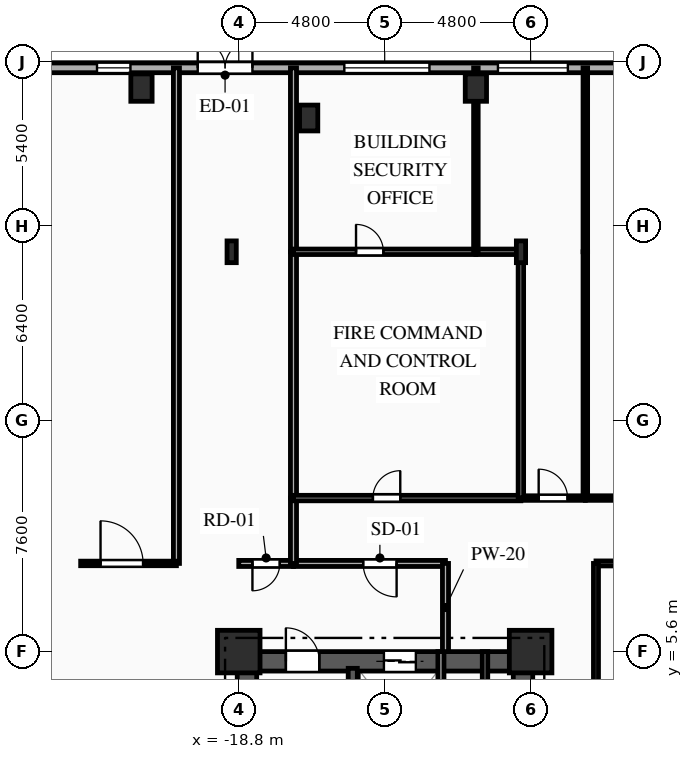
"""IFC4 building model, lengths in metres.
Left out: names, types, materials, properties, quantities, classifications, styles, units other than length and angle.
Written with IfcOpenShell. Run it as: python <this file> out.ifc"""

import sys

from ifc_helpers import new_model, si_unit, direction, frame, frame_2d, origin, origin_2d, place, context, subcontext, project, spatial, rectangle, i_section, extrude, element, fill, save


model = new_model("IFC4")
c1 = context("Model", 3, precision=1e-05, world=origin(), true_north=direction((0.0, 1.0)))
c2 = subcontext(c1, "Body", "Model", "MODEL_VIEW")
j1 = project(units=[si_unit("LENGTHUNIT", "METRE"), si_unit("PLANEANGLEUNIT", "RADIAN")], contexts=[c1])
p1 = place(None, origin())
s1 = spatial("IfcSite", under=j1, at=p1, CompositionType="ELEMENT")
p2 = place(p1, origin())
s2 = spatial("IfcBuilding", under=s1, at=p2, CompositionType="ELEMENT")
p3 = place(p2, origin())
s3 = spatial("IfcBuildingStorey", under=s2, at=p3, CompositionType="ELEMENT", Elevation=0.0)
for number, where, z_axis, x_axis in (
    (1, (-18.8, 5.6, 0.0), (0.0, 0.0, 1.0), (1.0, 0.0, 0.0)),
    (2, (-9.2, 5.6, 0.0), (0.0, 0.0, 1.0), (1.0, 0.0, 0.0)),
):
    element("IfcColumn", number, at=place(p3, frame(where, z_axis=z_axis, x_axis=x_axis)), inside=s3, PredefinedType="COLUMN", context=c2, shape_type="SweptSolid", body=[
        extrude(rectangle(XDim=1.4, YDim=1.4, at=origin_2d()), origin(), (0.0, 0.0, 1.0), 4.5),
    ])
for number, where, z_axis, x_axis in (
    (3, (-22.0, 24.15, 0.0), (0.0, 0.0, 1.0), (1.0, 0.0, 0.0)),
    (4, (-11.0, 24.15, 0.0), (0.0, 0.0, 1.0), (1.0, 0.0, 0.0)),
):
    element("IfcColumn", number, at=place(p3, frame(where, z_axis=z_axis, x_axis=x_axis)), inside=s3, PredefinedType="COLUMN", context=c2, shape_type="SweptSolid", body=[
        extrude(rectangle(XDim=0.7, YDim=0.9, at=origin_2d()), origin(), (0.0, 0.0, 1.0), 4.5),
    ])
p4 = place(p3, frame((-16.5, 23.15, 0.0), z_axis=(0.0, 0.0, 1.0), x_axis=(1.0, 0.0, 0.0)))
e5 = element("IfcColumn", 5, at=p4, inside=s3, PredefinedType="PILASTER", context=c2, shape_type="SweptSolid", body=[
    extrude(rectangle(XDim=0.6, YDim=0.85, at=origin_2d()), origin(), (0.0, 0.0, 1.0), 4.5),
])
for number, where, z_axis, x_axis in (
    (6, (-9.517, 18.75, 0.0), (0.0, 0.0, 1.0), (1.0, 0.0, 0.0)),
    (7, (-19.033, 18.75, 0.0), (0.0, 0.0, 1.0), (1.0, 0.0, 0.0)),
):
    element("IfcColumn", number, at=place(p3, frame(where, z_axis=z_axis, x_axis=x_axis)), inside=s3, PredefinedType="COLUMN", context=c2, shape_type="SweptSolid", body=[
        extrude(i_section(OverallWidth=0.304, OverallDepth=0.716, WebThickness=0.021, FlangeThickness=0.04, FilletRadius=0.027, at=origin_2d()), origin(), (0.0, 0.0, 1.0), 4.5),
    ])
p5 = place(p3, frame((-38.3, 24.8, 0.0), z_axis=(0.0, 0.0, 1.0), x_axis=(1.0, 0.0, 0.0)))
e8 = element("IfcWall", 8, at=p5, inside=s3, PredefinedType="SOLIDWALL", context=c2, shape_type="SweptSolid", body=[
    extrude(rectangle(XDim=76.6, YDim=0.32, at=frame_2d((38.3, 0.0))), origin(), (0.0, 0.0, 1.0), 4.17),
])
p6 = place(p5, frame((18.15, 0.0, 0.0)))
e9 = element("IfcOpeningElement", 9, at=p6, cuts=e8, PredefinedType="OPENING", context=c2, shape_type="SweptSolid", body=[
    extrude(rectangle(XDim=1.8, YDim=2.4, at=frame_2d((0.9, 1.2))), frame((0.0, 0.17, 0.0), z_axis=(0.0, -1.0, 0.0), x_axis=(1.0, 0.0, 0.0)), (0.0, 0.0, 1.0), 0.34),
])
p7 = place(p5, frame((31.9, 0.0, 0.0)))
e10 = element("IfcOpeningElement", 10, at=p7, cuts=e8, PredefinedType="OPENING", context=c2, shape_type="SweptSolid", body=[
    extrude(rectangle(XDim=1.8, YDim=2.4, at=frame_2d((0.9, 1.2))), frame((0.0, 0.17, 0.0), z_axis=(0.0, -1.0, 0.0), x_axis=(1.0, 0.0, 0.0)), (0.0, 0.0, 1.0), 0.34),
])
p8 = place(p5, frame((42.9, 0.0, 0.0)))
e11 = element("IfcOpeningElement", 11, at=p8, cuts=e8, PredefinedType="OPENING", context=c2, shape_type="SweptSolid", body=[
    extrude(rectangle(XDim=1.8, YDim=2.4, at=frame_2d((0.9, 1.2))), frame((0.0, 0.17, 0.0), z_axis=(0.0, -1.0, 0.0), x_axis=(1.0, 0.0, 0.0)), (0.0, 0.0, 1.0), 0.34),
])
p9 = place(p5, frame((56.65, 0.0, 0.0)))
e12 = element("IfcOpeningElement", 12, at=p9, cuts=e8, PredefinedType="OPENING", context=c2, shape_type="SweptSolid", body=[
    extrude(rectangle(XDim=1.8, YDim=2.4, at=frame_2d((0.9, 1.2))), frame((0.0, 0.17, 0.0), z_axis=(0.0, -1.0, 0.0), x_axis=(1.0, 0.0, 0.0)), (0.0, 0.0, 1.0), 0.34),
])
p10 = place(p5, frame((14.838, 0.0, 0.85)))
e13 = element("IfcOpeningElement", 13, at=p10, cuts=e8, PredefinedType="OPENING", context=c2, shape_type="SweptSolid", body=[
    extrude(rectangle(XDim=1.1, YDim=1.85, at=frame_2d((0.55, 0.925))), frame((0.0, 0.17, 0.0), z_axis=(0.0, -1.0, 0.0), x_axis=(1.0, 0.0, 0.0)), (0.0, 0.0, 1.0), 0.34),
])
p11 = place(p5, frame((22.973, 0.0, 0.85)))
e14 = element("IfcOpeningElement", 14, at=p11, cuts=e8, PredefinedType="OPENING", context=c2, shape_type="SweptSolid", body=[
    extrude(rectangle(XDim=2.8, YDim=2.4, at=frame_2d((1.4, 1.2))), frame((0.0, 0.17, 0.0), z_axis=(0.0, -1.0, 0.0), x_axis=(1.0, 0.0, 0.0)), (0.0, 0.0, 1.0), 0.34),
])
p12 = place(p5, frame((28.025, 0.0, 0.85)))
e15 = element("IfcOpeningElement", 15, at=p12, cuts=e8, PredefinedType="OPENING", context=c2, shape_type="SweptSolid", body=[
    extrude(rectangle(XDim=2.3, YDim=2.4, at=frame_2d((1.15, 1.2))), frame((0.0, 0.17, 0.0), z_axis=(0.0, -1.0, 0.0), x_axis=(1.0, 0.0, 0.0)), (0.0, 0.0, 1.0), 0.34),
])
p13 = place(p5, frame((34.521, 0.0, 0.85)))
e16 = element("IfcOpeningElement", 16, at=p13, cuts=e8, PredefinedType="OPENING", context=c2, shape_type="SweptSolid", body=[
    extrude(rectangle(XDim=2.8, YDim=2.4, at=frame_2d((1.4, 1.2))), frame((0.0, 0.17, 0.0), z_axis=(0.0, -1.0, 0.0), x_axis=(1.0, 0.0, 0.0)), (0.0, 0.0, 1.0), 0.34),
])
p14 = place(p3, frame((-18.8, 5.28, 0.0), z_axis=(0.0, 0.0, 1.0), x_axis=(1.0, 0.0, 0.0)))
e17 = element("IfcWall", 17, at=p14, inside=s3, PredefinedType="SHEAR", context=c2, shape_type="SweptSolid", body=[
    extrude(rectangle(XDim=9.6, YDim=0.64, at=frame_2d((4.8, 0.0))), origin(), (0.0, 0.0, 1.0), 4.17),
])
p15 = place(p14, frame((1.55, 0.0, 0.0)))
e18 = element("IfcOpeningElement", 18, at=p15, cuts=e17, PredefinedType="OPENING", context=c2, shape_type="SweptSolid", body=[
    extrude(rectangle(XDim=1.1, YDim=2.15, at=frame_2d((0.55, 1.075))), frame((0.0, 0.33, 0.0), z_axis=(0.0, -1.0, 0.0), x_axis=(1.0, 0.0, 0.0)), (0.0, 0.0, 1.0), 0.66),
])
p16 = place(p14, frame((4.775, 0.0, 0.0)))
e19 = element("IfcOpeningElement", 19, at=p16, cuts=e17, PredefinedType="OPENING", context=c2, shape_type="SweptSolid", body=[
    extrude(rectangle(XDim=1.05, YDim=2.1, at=frame_2d((0.525, 1.05))), frame((0.0, 0.33, 0.0), z_axis=(0.0, -1.0, 0.0), x_axis=(1.0, 0.0, 0.0)), (0.0, 0.0, 1.0), 0.66),
])
p17 = place(p3, frame((-18.53, -5.05, 0.0), z_axis=(0.0, 0.0, 1.0), x_axis=(0.0, 1.0, 0.0)))
e20 = element("IfcWall", 20, at=p17, inside=s3, PredefinedType="SHEAR", context=c2, shape_type="SweptSolid", body=[
    extrude(rectangle(XDim=10.1, YDim=0.64, at=frame_2d((5.05, 0.0))), origin(), (0.0, 0.0, 1.0), 4.17),
])
p18 = place(p3, frame((-9.45, -5.05, 0.0), z_axis=(0.0, 0.0, 1.0), x_axis=(0.0, 1.0, 0.0)))
e21 = element("IfcWall", 21, at=p18, inside=s3, PredefinedType="SHEAR", context=c2, shape_type="SweptSolid", body=[
    extrude(rectangle(XDim=10.1, YDim=0.64, at=frame_2d((5.05, 0.0))), origin(), (0.0, 0.0, 1.0), 4.17),
])
p19 = place(p18, frame((7.15, 0.0, 0.0)))
e22 = element("IfcOpeningElement", 22, at=p19, cuts=e21, PredefinedType="OPENING", context=c2, shape_type="SweptSolid", body=[
    extrude(rectangle(XDim=0.9, YDim=2.1, at=frame_2d((0.45, 1.05))), frame((0.0, 0.33, 0.0), z_axis=(0.0, -1.0, 0.0), x_axis=(1.0, 0.0, 0.0)), (0.0, 0.0, 1.0), 0.66),
])
p20 = place(p18, frame((2.4, 0.0, 0.0)))
e23 = element("IfcOpeningElement", 23, at=p20, cuts=e21, PredefinedType="OPENING", context=c2, shape_type="SweptSolid", body=[
    extrude(rectangle(XDim=1.2, YDim=2.15, at=frame_2d((0.6, 1.075))), frame((0.0, 0.33, 0.0), z_axis=(0.0, -1.0, 0.0), x_axis=(1.0, 0.0, 0.0)), (0.0, 0.0, 1.0), 0.66),
])
p21 = place(p3, frame((-15.05, -5.05, 0.0), z_axis=(0.0, 0.0, 1.0), x_axis=(0.0, 1.0, 0.0)))
e24 = element("IfcWall", 24, at=p21, inside=s3, PredefinedType="SHEAR", context=c2, shape_type="SweptSolid", body=[
    extrude(rectangle(XDim=10.1, YDim=0.3, at=frame_2d((5.05, 0.0))), origin(), (0.0, 0.0, 1.0), 4.17),
])
p22 = place(p3, frame((-12.15, 1.55, 0.0), z_axis=(0.0, 0.0, 1.0), x_axis=(0.0, 1.0, 0.0)))
e25 = element("IfcWall", 25, at=p22, inside=s3, PredefinedType="PARTITIONING", context=c2, shape_type="SweptSolid", body=[
    extrude(rectangle(XDim=4.05, YDim=0.2, at=frame_2d((2.025, 0.0))), origin(), (0.0, 0.0, 1.0), 4.17),
])
p23 = place(p3, frame((-17.0, 8.5, 0.0), z_axis=(0.0, 0.0, 1.0), x_axis=(-1.0, 0.0, 0.0)))
e26 = element("IfcWall", 26, at=p23, inside=s3, PredefinedType="PARTITIONING", context=c2, shape_type="SweptSolid", body=[
    extrude(rectangle(XDim=1.8, YDim=0.2, at=frame_2d((0.9, 0.0))), origin(), (0.0, 0.0, 1.0), 4.17),
])
p24 = place(p23, frame((0.45, 0.0, 0.0)))
e27 = element("IfcOpeningElement", 27, at=p24, cuts=e26, PredefinedType="OPENING", context=c2, shape_type="SweptSolid", body=[
    extrude(rectangle(XDim=0.9, YDim=2.1, at=frame_2d((0.45, 1.05))), frame((0.0, 0.11, 0.0), z_axis=(0.0, -1.0, 0.0), x_axis=(1.0, 0.0, 0.0)), (0.0, 0.0, 1.0), 0.22),
])
p25 = place(p3, frame((-12.0, 8.5, 0.0), z_axis=(0.0, 0.0, 1.0), x_axis=(-1.0, 0.0, 0.0)))
e28 = element("IfcWall", 28, at=p25, inside=s3, PredefinedType="PARTITIONING", context=c2, shape_type="SweptSolid", body=[
    extrude(rectangle(XDim=5.0, YDim=0.2, at=frame_2d((2.5, 0.0))), origin(), (0.0, 0.0, 1.0), 4.17),
])
p26 = place(p25, frame((1.607, 0.0, 0.0)))
e29 = element("IfcOpeningElement", 29, at=p26, cuts=e28, PredefinedType="OPENING", context=c2, shape_type="SweptSolid", body=[
    extrude(rectangle(XDim=1.1, YDim=2.15, at=frame_2d((0.55, 1.075))), frame((0.0, 0.11, 0.0), z_axis=(0.0, -1.0, 0.0), x_axis=(1.0, 0.0, 0.0)), (0.0, 0.0, 1.0), 0.22),
])
p27 = place(p3, frame((-12.0, 5.6, 0.0), z_axis=(0.0, 0.0, 1.0), x_axis=(0.0, 1.0, 0.0)))
e30 = element("IfcWall", 30, at=p27, inside=s3, PredefinedType="PARTITIONING", context=c2, shape_type="SweptSolid", body=[
    extrude(rectangle(XDim=2.9, YDim=0.2, at=frame_2d((1.45, 0.0))), origin(), (0.0, 0.0, 1.0), 4.17),
])
p28 = place(p3, frame((-10.7, 5.6, 0.0), z_axis=(0.0, 0.0, 1.0), x_axis=(0.0, -1.0, 0.0)))
e31 = element("IfcWall", 31, at=p28, inside=s3, PredefinedType="PARTITIONING", context=c2, shape_type="SweptSolid", body=[
    extrude(rectangle(XDim=4.05, YDim=0.18, at=frame_2d((2.025, 0.0))), origin(), (0.0, 0.0, 1.0), 4.17),
])
p29 = place(p28, frame((1.325, 0.0, 0.0)))
e32 = element("IfcOpeningElement", 32, at=p29, cuts=e31, PredefinedType="OPENING", context=c2, shape_type="SweptSolid", body=[
    extrude(rectangle(XDim=1.25, YDim=2.2, at=frame_2d((0.625, 1.1))), frame((0.0, 0.1, 0.0), z_axis=(0.0, -1.0, 0.0), x_axis=(1.0, 0.0, 0.0)), (0.0, 0.0, 1.0), 0.2),
])
p30 = place(p3, frame((-17.0, 10.65, 0.0), z_axis=(0.0, 0.0, 1.0), x_axis=(0.0, -1.0, 0.0)))
e33 = element("IfcWall", 33, at=p30, inside=s3, PredefinedType="PARTITIONING", context=c2, shape_type="SweptSolid", body=[
    extrude(rectangle(XDim=2.15, YDim=0.2, at=frame_2d((1.075, 0.0))), origin(), (0.0, 0.0, 1.0), 4.17),
])
p31 = place(p3, frame((-17.0, 18.75, 0.0), z_axis=(0.0, 0.0, 1.0), x_axis=(0.0, -1.0, 0.0)))
e34 = element("IfcWall", 34, at=p31, inside=s3, PredefinedType="PARTITIONING", context=c2, shape_type="SweptSolid", body=[
    extrude(rectangle(XDim=8.1, YDim=0.2, at=frame_2d((4.05, 0.0))), origin(), (0.0, 0.0, 1.0), 4.17),
])
p32 = place(p3, frame((-17.0, 24.8, 0.0), z_axis=(0.0, 0.0, 1.0), x_axis=(0.0, -1.0, 0.0)))
e35 = element("IfcWall", 35, at=p32, inside=s3, PredefinedType="PARTITIONING", context=c2, shape_type="SweptSolid", body=[
    extrude(rectangle(XDim=6.05, YDim=0.2, at=frame_2d((3.025, 0.0))), origin(), (0.0, 0.0, 1.0), 4.17),
])
p33 = place(p3, frame((-20.85, 8.5, 0.0), z_axis=(0.0, 0.0, 1.0), x_axis=(0.0, 1.0, 0.0)))
e36 = element("IfcWall", 36, at=p33, inside=s3, PredefinedType="PARTITIONING", context=c2, shape_type="SweptSolid", body=[
    extrude(rectangle(XDim=16.3, YDim=0.2, at=frame_2d((8.15, 0.0))), origin(), (0.0, 0.0, 1.0), 4.17),
])
p34 = place(p3, frame((-17.0, 10.65, 0.0), z_axis=(0.0, 0.0, 1.0), x_axis=(1.0, 0.0, 0.0)))
e37 = element("IfcWall", 37, at=p34, inside=s3, PredefinedType="PARTITIONING", context=c2, shape_type="SweptSolid", body=[
    extrude(rectangle(XDim=7.48, YDim=0.18, at=frame_2d((3.74, 0.0))), origin(), (0.0, 0.0, 1.0), 4.17),
])
p35 = place(p34, frame((2.613, 0.0, 0.0)))
e38 = element("IfcOpeningElement", 38, at=p35, cuts=e37, PredefinedType="OPENING", context=c2, shape_type="SweptSolid", body=[
    extrude(rectangle(XDim=0.9, YDim=2.1, at=frame_2d((0.45, 1.05))), frame((0.0, 0.1, 0.0), z_axis=(0.0, -1.0, 0.0), x_axis=(1.0, 0.0, 0.0)), (0.0, 0.0, 1.0), 0.2),
])
p36 = place(p3, frame((-9.52, 10.65, 0.0), z_axis=(0.0, 0.0, 1.0), x_axis=(1.0, 0.0, 0.0)))
e39 = element("IfcWall", 39, at=p36, inside=s3, PredefinedType="PARTITIONING", context=c2, shape_type="SweptSolid", body=[
    extrude(rectangle(XDim=2.12, YDim=0.15, at=frame_2d((1.06, 0.0))), origin(), (0.0, 0.0, 1.0), 4.17),
])
p37 = place(p36, frame((0.585, 0.0, 0.0)))
e40 = element("IfcOpeningElement", 40, at=p37, cuts=e39, PredefinedType="OPENING", context=c2, shape_type="SweptSolid", body=[
    extrude(rectangle(XDim=0.95, YDim=2.1, at=frame_2d((0.475, 1.05))), frame((0.0, 0.085, 0.0), z_axis=(0.0, -1.0, 0.0), x_axis=(1.0, 0.0, 0.0)), (0.0, 0.0, 1.0), 0.17),
])
p38 = place(p3, frame((-7.4, 10.65, 0.0), z_axis=(0.0, 0.0, 1.0), x_axis=(1.0, 0.0, 0.0)))
e41 = element("IfcWall", 41, at=p38, inside=s3, PredefinedType="PARTITIONING", context=c2, shape_type="SweptSolid", body=[
    extrude(rectangle(XDim=7.4, YDim=0.15, at=frame_2d((3.7, 0.0))), origin(), (0.0, 0.0, 1.0), 4.17),
])
p39 = place(p3, frame((0.0, 8.5, 0.0), z_axis=(0.0, 0.0, 1.0), x_axis=(-1.0, 0.0, 0.0)))
e42 = element("IfcWall", 42, at=p39, inside=s3, PredefinedType="PARTITIONING", context=c2, shape_type="SweptSolid", body=[
    extrude(rectangle(XDim=7.05, YDim=0.165, at=frame_2d((3.525, 0.0))), origin(), (0.0, 0.0, 1.0), 4.17),
])
p40 = place(p3, frame((-7.05, 8.5, 0.0), z_axis=(0.0, 0.0, 1.0), x_axis=(0.0, -1.0, 0.0)))
e43 = element("IfcWall", 43, at=p40, inside=s3, PredefinedType="PARTITIONING", context=c2, shape_type="SweptSolid", body=[
    extrude(rectangle(XDim=14.1, YDim=0.165, at=frame_2d((7.05, 0.0))), origin(), (0.0, 0.0, 1.0), 4.17),
])
p41 = place(p40, frame((7.949, 0.0, 0.0)))
e44 = element("IfcOpeningElement", 44, at=p41, cuts=e43, PredefinedType="OPENING", context=c2, shape_type="SweptSolid", body=[
    extrude(rectangle(XDim=1.15, YDim=2.15, at=frame_2d((0.575, 1.075))), frame((0.0, 0.093, 0.0), z_axis=(0.0, -1.0, 0.0), x_axis=(1.0, 0.0, 0.0)), (0.0, 0.0, 1.0), 0.185),
])
p42 = place(p3, frame((-24.0, 8.5, 0.0), z_axis=(0.0, 0.0, 1.0), x_axis=(1.0, 0.0, 0.0)))
e45 = element("IfcWall", 45, at=p42, inside=s3, PredefinedType="PARTITIONING", context=c2, shape_type="SweptSolid", body=[
    extrude(rectangle(XDim=3.15, YDim=0.15, at=frame_2d((1.575, 0.0))), origin(), (0.0, 0.0, 1.0), 4.17),
])
p43 = place(p42, frame((0.654, 0.0, 0.0)))
e46 = element("IfcOpeningElement", 46, at=p43, cuts=e45, PredefinedType="OPENING", context=c2, shape_type="SweptSolid", body=[
    extrude(rectangle(XDim=1.4, YDim=2.3, at=frame_2d((0.7, 1.15))), frame((0.0, 0.085, 0.0), z_axis=(0.0, -1.0, 0.0), x_axis=(1.0, 0.0, 0.0)), (0.0, 0.0, 1.0), 0.17),
])
p44 = place(p3, frame((-17.0, 18.75, 0.0), z_axis=(0.0, 0.0, 1.0), x_axis=(1.0, 0.0, 0.0)))
e47 = element("IfcWall", 47, at=p44, inside=s3, PredefinedType="PARTITIONING", context=c2, shape_type="SweptSolid", body=[
    extrude(rectangle(XDim=6.0, YDim=0.18, at=frame_2d((3.0, 0.0))), origin(), (0.0, 0.0, 1.0), 3.555),
])
p45 = place(p44, frame((2.058, 0.0, 0.0)))
e48 = element("IfcOpeningElement", 48, at=p45, cuts=e47, PredefinedType="OPENING", context=c2, shape_type="SweptSolid", body=[
    extrude(rectangle(XDim=0.9, YDim=2.1, at=frame_2d((0.45, 1.05))), frame((0.0, 0.1, 0.0), z_axis=(0.0, -1.0, 0.0), x_axis=(1.0, 0.0, 0.0)), (0.0, 0.0, 1.0), 0.2),
])
p46 = place(p3, frame((-9.52, 18.75, 0.0), z_axis=(0.0, 0.0, 1.0), x_axis=(0.0, -1.0, 0.0)))
e49 = element("IfcWall", 49, at=p46, inside=s3, PredefinedType="PARTITIONING", context=c2, shape_type="SweptSolid", body=[
    extrude(rectangle(XDim=8.1, YDim=0.18, at=frame_2d((4.05, 0.0))), origin(), (0.0, 0.0, 1.0), 3.655),
])
p47 = place(p3, frame((-11.0, 18.75, 0.0), z_axis=(0.0, 0.0, 1.0), x_axis=(1.0, 0.0, 0.0)))
e50 = element("IfcWall", 50, at=p47, inside=s3, PredefinedType="PARTITIONING", context=c2, shape_type="SweptSolid", body=[
    extrude(rectangle(XDim=1.48, YDim=0.18, at=frame_2d((0.74, 0.0))), origin(), (0.0, 0.0, 1.0), 3.555),
])
p48 = place(p3, frame((-11.0, 24.8, 0.0), z_axis=(0.0, 0.0, 1.0), x_axis=(0.0, -1.0, 0.0)))
e51 = element("IfcWall", 51, at=p48, inside=s3, PredefinedType="PARTITIONING", context=c2, shape_type="SweptSolid", body=[
    extrude(rectangle(XDim=6.05, YDim=0.15, at=frame_2d((3.025, 0.0))), origin(), (0.0, 0.0, 1.0), 3.555),
])
p49 = place(p3, frame((-7.4, 18.75, 0.0), z_axis=(0.0, 0.0, 1.0), x_axis=(0.0, -1.0, 0.0)))
e52 = element("IfcWall", 52, at=p49, inside=s3, PredefinedType="PARTITIONING", context=c2, shape_type="SweptSolid", body=[
    extrude(rectangle(XDim=8.1, YDim=0.15, at=frame_2d((4.05, 0.0))), origin(), (0.0, 0.0, 1.0), 4.17),
])
p50 = place(p3, frame((-7.4, 24.8, 0.0), z_axis=(0.0, 0.0, 1.0), x_axis=(0.0, -1.0, 0.0)))
e53 = element("IfcWall", 53, at=p50, inside=s3, PredefinedType="PARTITIONING", context=c2, shape_type="SweptSolid", body=[
    extrude(rectangle(XDim=6.05, YDim=0.15, at=frame_2d((3.025, 0.0))), origin(), (0.0, 0.0, 1.0), 4.17),
])
p51 = place(p6, origin())
e54 = element("IfcDoor", 54, at=p51, inside=s3, OperationType="DOUBLE_DOOR_SINGLE_SWING", PredefinedType="DOOR", context=c2, shape_type="SweptSolid", body=[
    extrude(rectangle(XDim=1.8, YDim=2.4, at=frame_2d((0.9, 1.2))), frame((0.0, 0.025, 0.0), z_axis=(0.0, -1.0, 0.0), x_axis=(1.0, 0.0, 0.0)), (0.0, 0.0, 1.0), 0.05),
])
fill(e9, e54)
p52 = place(p10, origin())
e55 = element("IfcWindow", 55, at=p52, inside=s3, PartitioningType="SINGLE_PANEL", PredefinedType="WINDOW", context=c2, shape_type="SweptSolid", body=[
    extrude(rectangle(XDim=1.1, YDim=1.85, at=frame_2d((0.55, 0.925))), frame((0.0, 0.03, 0.0), z_axis=(0.0, -1.0, 0.0), x_axis=(1.0, 0.0, 0.0)), (0.0, 0.0, 1.0), 0.06),
])
fill(e13, e55)
p53 = place(p11, origin())
e56 = element("IfcWindow", 56, at=p53, inside=s3, PartitioningType="SINGLE_PANEL", PredefinedType="WINDOW", context=c2, shape_type="SweptSolid", body=[
    extrude(rectangle(XDim=2.8, YDim=2.4, at=frame_2d((1.4, 1.2))), frame((0.0, 0.03, 0.0), z_axis=(0.0, -1.0, 0.0), x_axis=(1.0, 0.0, 0.0)), (0.0, 0.0, 1.0), 0.06),
])
fill(e14, e56)
p54 = place(p12, origin())
e57 = element("IfcWindow", 57, at=p54, inside=s3, PartitioningType="SINGLE_PANEL", PredefinedType="WINDOW", context=c2, shape_type="SweptSolid", body=[
    extrude(rectangle(XDim=2.3, YDim=2.4, at=frame_2d((1.15, 1.2))), frame((0.0, 0.03, 0.0), z_axis=(0.0, -1.0, 0.0), x_axis=(1.0, 0.0, 0.0)), (0.0, 0.0, 1.0), 0.06),
])
fill(e15, e57)
p55 = place(p15, origin())
e58 = element("IfcDoor", 58, at=p55, inside=s3, OperationType="SINGLE_SWING_LEFT", PredefinedType="DOOR", context=c2, shape_type="SweptSolid", body=[
    extrude(rectangle(XDim=1.1, YDim=2.15, at=frame_2d((0.55, 1.075))), frame((0.0, 0.025, 0.0), z_axis=(0.0, -1.0, 0.0), x_axis=(1.0, 0.0, 0.0)), (0.0, 0.0, 1.0), 0.05),
])
fill(e18, e58)
p56 = place(p16, origin())
e59 = element("IfcDoor", 59, at=p56, inside=s3, OperationType="DOUBLE_DOOR_SLIDING", PredefinedType="DOOR", context=c2, shape_type="SweptSolid", body=[
    extrude(rectangle(XDim=1.05, YDim=2.1, at=frame_2d((0.525, 1.05))), frame((0.0, 0.025, 0.0), z_axis=(0.0, -1.0, 0.0), x_axis=(1.0, 0.0, 0.0)), (0.0, 0.0, 1.0), 0.05),
])
fill(e19, e59)
p57 = place(p24, origin())
e60 = element("IfcDoor", 60, at=p57, inside=s3, OperationType="SINGLE_SWING_RIGHT", PredefinedType="DOOR", context=c2, shape_type="SweptSolid", body=[
    extrude(rectangle(XDim=0.9, YDim=2.1, at=frame_2d((0.45, 1.05))), frame((0.0, 0.025, 0.0), z_axis=(0.0, -1.0, 0.0), x_axis=(1.0, 0.0, 0.0)), (0.0, 0.0, 1.0), 0.05),
])
fill(e27, e60)
p58 = place(p26, origin())
e61 = element("IfcDoor", 61, at=p58, inside=s3, OperationType="SINGLE_SWING_LEFT", PredefinedType="DOOR", context=c2, shape_type="SweptSolid", body=[
    extrude(rectangle(XDim=1.1, YDim=2.15, at=frame_2d((0.55, 1.075))), frame((0.0, 0.025, 0.0), z_axis=(0.0, -1.0, 0.0), x_axis=(1.0, 0.0, 0.0)), (0.0, 0.0, 1.0), 0.05),
])
fill(e29, e61)
p59 = place(p35, origin())
e62 = element("IfcDoor", 62, at=p59, inside=s3, OperationType="SINGLE_SWING_RIGHT", PredefinedType="DOOR", context=c2, shape_type="SweptSolid", body=[
    extrude(rectangle(XDim=0.9, YDim=2.1, at=frame_2d((0.45, 1.05))), frame((0.0, 0.025, 0.0), z_axis=(0.0, -1.0, 0.0), x_axis=(1.0, 0.0, 0.0)), (0.0, 0.0, 1.0), 0.05),
])
fill(e38, e62)
p60 = place(p37, origin())
e63 = element("IfcDoor", 63, at=p60, inside=s3, OperationType="SINGLE_SWING_LEFT", PredefinedType="DOOR", context=c2, shape_type="SweptSolid", body=[
    extrude(rectangle(XDim=0.95, YDim=2.1, at=frame_2d((0.475, 1.05))), frame((0.0, 0.025, 0.0), z_axis=(0.0, -1.0, 0.0), x_axis=(1.0, 0.0, 0.0)), (0.0, 0.0, 1.0), 0.05),
])
fill(e40, e63)
p61 = place(p43, origin())
e64 = element("IfcDoor", 64, at=p61, inside=s3, OperationType="SINGLE_SWING_LEFT", PredefinedType="DOOR", context=c2, shape_type="SweptSolid", body=[
    extrude(rectangle(XDim=1.4, YDim=2.3, at=frame_2d((0.7, 1.15))), frame((0.0, 0.025, 0.0), z_axis=(0.0, -1.0, 0.0), x_axis=(1.0, 0.0, 0.0)), (0.0, 0.0, 1.0), 0.05),
])
fill(e46, e64)
p62 = place(p45, origin())
e65 = element("IfcDoor", 65, at=p62, inside=s3, OperationType="SINGLE_SWING_LEFT", PredefinedType="DOOR", context=c2, shape_type="SweptSolid", body=[
    extrude(rectangle(XDim=0.9, YDim=2.1, at=frame_2d((0.45, 1.05))), frame((0.0, 0.025, 0.0), z_axis=(0.0, -1.0, 0.0), x_axis=(1.0, 0.0, 0.0)), (0.0, 0.0, 1.0), 0.05),
])
fill(e48, e65)
save(model, sys.argv[1])
